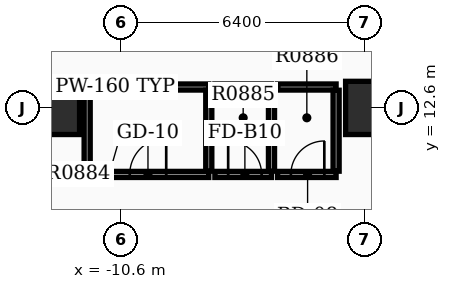
"""IFC4 building model, lengths in metres.
Left out: names, types, materials, properties, quantities, classifications, styles, units other than length and angle.
Written with IfcOpenShell. Run it as: python <this file> out.ifc"""

import sys

from ifc_helpers import new_model, si_unit, direction, frame, frame_2d, origin, origin_2d, place, context, subcontext, project, spatial, rectangle, extrude, element, fill, save


model = new_model("IFC4")
c1 = context("Model", 3, precision=1e-05, world=origin(), true_north=direction((0.0, 1.0)))
c2 = subcontext(c1, "Body", "Model", "MODEL_VIEW")
j1 = project(units=[si_unit("LENGTHUNIT", "METRE"), si_unit("PLANEANGLEUNIT", "RADIAN")], contexts=[c1])
p1 = place(None, origin())
s1 = spatial("IfcSite", under=j1, at=p1, CompositionType="ELEMENT")
p2 = place(p1, origin())
s2 = spatial("IfcBuilding", under=s1, at=p2, CompositionType="ELEMENT")
p3 = place(p2, frame((0.0, 0.0, 60.0)))
s3 = spatial("IfcBuildingStorey", under=s2, at=p3, CompositionType="ELEMENT", Elevation=60.0)
for number, where, z_axis, x_axis in (
    (1, (-12.4, 12.6, 0.0), (0.0, 0.0, 1.0), (1.0, 0.0, 0.0)),
    (2, (-4.0, 12.6, 0.0), (0.0, 0.0, 1.0), (1.0, 0.0, 0.0)),
):
    element("IfcColumn", number, at=place(p3, frame(where, z_axis=z_axis, x_axis=x_axis)), inside=s3, PredefinedType="COLUMN", context=c2, shape_type="SweptSolid", body=[
        extrude(rectangle(XDim=1.4, YDim=1.4, at=origin_2d()), origin(), (0.0, 0.0, 1.0), 3.9),
    ])
p4 = place(p3, frame((-11.5, 10.85, 0.0), z_axis=(0.0, 0.0, 1.0), x_axis=(1.0, 0.0, 0.0)))
e3 = element("IfcWall", 3, at=p4, inside=s3, PredefinedType="PARTITIONING", context=c2, shape_type="SweptSolid", body=[
    extrude(rectangle(XDim=3.2, YDim=0.16, at=frame_2d((1.6, 0.0))), origin(), (0.0, 0.0, 1.0), 2.9),
])
p5 = place(p4, frame((1.12, 0.0, 0.0)))
e4 = element("IfcOpeningElement", 4, at=p5, cuts=e3, PredefinedType="OPENING", context=c2, shape_type="SweptSolid", body=[
    extrude(rectangle(XDim=0.96, YDim=2.15, at=frame_2d((0.48, 1.075))), frame((0.0, 0.09, 0.0), z_axis=(0.0, -1.0, 0.0), x_axis=(1.0, 0.0, 0.0)), (0.0, 0.0, 1.0), 0.18),
])
p6 = place(p3, frame((-11.5, 13.15, 0.0), z_axis=(0.0, 0.0, 1.0), x_axis=(1.0, 0.0, 0.0)))
e5 = element("IfcWall", 5, at=p6, inside=s3, PredefinedType="PARTITIONING", context=c2, shape_type="SweptSolid", body=[
    extrude(rectangle(XDim=3.2, YDim=0.16, at=frame_2d((1.6, 0.0))), origin(), (0.0, 0.0, 1.0), 2.9),
])
for number, where, z_axis, x_axis in (
    (6, (-11.5, 10.935, 0.0), (0.0, 0.0, 1.0), (0.0, 1.0, 0.0)),
    (7, (-8.3, 10.935, 0.0), (0.0, 0.0, 1.0), (0.0, 1.0, 0.0)),
):
    element("IfcWall", number, at=place(p3, frame(where, z_axis=z_axis, x_axis=x_axis)), inside=s3, PredefinedType="PARTITIONING", context=c2, shape_type="SweptSolid", body=[
        extrude(rectangle(XDim=2.13, YDim=0.16, at=frame_2d((1.065, 0.0))), origin(), (0.0, 0.0, 1.0), 2.9),
    ])
p7 = place(p3, frame((-8.14, 10.85, 0.0), z_axis=(0.0, 0.0, 1.0), x_axis=(1.0, 0.0, 0.0)))
e8 = element("IfcWall", 8, at=p7, inside=s3, PredefinedType="PARTITIONING", context=c2, shape_type="SweptSolid", body=[
    extrude(rectangle(XDim=1.49, YDim=0.16, at=frame_2d((0.745, 0.0))), origin(), (0.0, 0.0, 1.0), 2.9),
])
p8 = place(p7, frame((0.35, 0.0, 0.0)))
e9 = element("IfcOpeningElement", 9, at=p8, cuts=e8, PredefinedType="OPENING", context=c2, shape_type="SweptSolid", body=[
    extrude(rectangle(XDim=0.88, YDim=2.1, at=frame_2d((0.44, 1.05))), frame((0.0, 0.09, 0.0), z_axis=(0.0, -1.0, 0.0), x_axis=(1.0, 0.0, 0.0)), (0.0, 0.0, 1.0), 0.18),
])
p9 = place(p3, frame((-8.14, 13.15, 0.0), z_axis=(0.0, 0.0, 1.0), x_axis=(1.0, 0.0, 0.0)))
e10 = element("IfcWall", 10, at=p9, inside=s3, PredefinedType="PARTITIONING", context=c2, shape_type="SweptSolid", body=[
    extrude(rectangle(XDim=1.49, YDim=0.16, at=frame_2d((0.745, 0.0))), origin(), (0.0, 0.0, 1.0), 2.9),
])
p10 = place(p3, frame((-6.65, 10.935, 0.0), z_axis=(0.0, 0.0, 1.0), x_axis=(0.0, 1.0, 0.0)))
e11 = element("IfcWall", 11, at=p10, inside=s3, PredefinedType="PARTITIONING", context=c2, shape_type="SweptSolid", body=[
    extrude(rectangle(XDim=2.13, YDim=0.16, at=frame_2d((1.065, 0.0))), origin(), (0.0, 0.0, 1.0), 2.9),
])
p11 = place(p3, frame((-6.49, 10.85, 0.0), z_axis=(0.0, 0.0, 1.0), x_axis=(1.0, 0.0, 0.0)))
e12 = element("IfcWall", 12, at=p11, inside=s3, PredefinedType="PARTITIONING", context=c2, shape_type="SweptSolid", body=[
    extrude(rectangle(XDim=1.54, YDim=0.16, at=frame_2d((0.77, 0.0))), origin(), (0.0, 0.0, 1.0), 2.9),
])
p12 = place(p11, frame((0.35, 0.0, 0.0)))
e13 = element("IfcOpeningElement", 13, at=p12, cuts=e12, PredefinedType="OPENING", context=c2, shape_type="SweptSolid", body=[
    extrude(rectangle(XDim=0.88, YDim=2.15, at=frame_2d((0.44, 1.075))), frame((0.0, 0.09, 0.0), z_axis=(0.0, -1.0, 0.0), x_axis=(1.0, 0.0, 0.0)), (0.0, 0.0, 1.0), 0.18),
])
p13 = place(p3, frame((-6.49, 13.15, 0.0), z_axis=(0.0, 0.0, 1.0), x_axis=(1.0, 0.0, 0.0)))
e14 = element("IfcWall", 14, at=p13, inside=s3, PredefinedType="PARTITIONING", context=c2, shape_type="SweptSolid", body=[
    extrude(rectangle(XDim=1.54, YDim=0.16, at=frame_2d((0.77, 0.0))), origin(), (0.0, 0.0, 1.0), 2.9),
])
p14 = place(p3, frame((-4.95, 10.935, 0.0), z_axis=(0.0, 0.0, 1.0), x_axis=(0.0, 1.0, 0.0)))
e15 = element("IfcWall", 15, at=p14, inside=s3, PredefinedType="PARTITIONING", context=c2, shape_type="SweptSolid", body=[
    extrude(rectangle(XDim=2.13, YDim=0.16, at=frame_2d((1.065, 0.0))), origin(), (0.0, 0.0, 1.0), 2.9),
])
p15 = place(p5, origin())
e16 = element("IfcDoor", 16, at=p15, inside=s3, OperationType="SINGLE_SWING_RIGHT", PredefinedType="DOOR", context=c2, shape_type="SweptSolid", body=[
    extrude(rectangle(XDim=0.96, YDim=2.15, at=frame_2d((0.48, 1.075))), frame((0.0, 0.025, 0.0), z_axis=(0.0, -1.0, 0.0), x_axis=(1.0, 0.0, 0.0)), (0.0, 0.0, 1.0), 0.05),
])
fill(e4, e16)
p16 = place(p8, origin())
e17 = element("IfcDoor", 17, at=p16, inside=s3, OperationType="SINGLE_SWING_LEFT", PredefinedType="DOOR", context=c2, shape_type="SweptSolid", body=[
    extrude(rectangle(XDim=0.88, YDim=2.1, at=frame_2d((0.44, 1.05))), frame((0.0, 0.025, 0.0), z_axis=(0.0, -1.0, 0.0), x_axis=(1.0, 0.0, 0.0)), (0.0, 0.0, 1.0), 0.05),
])
fill(e9, e17)
p17 = place(p12, origin())
e18 = element("IfcDoor", 18, at=p17, inside=s3, OperationType="SINGLE_SWING_RIGHT", PredefinedType="DOOR", context=c2, shape_type="SweptSolid", body=[
    extrude(rectangle(XDim=0.88, YDim=2.15, at=frame_2d((0.44, 1.075))), frame((0.0, 0.025, 0.0), z_axis=(0.0, -1.0, 0.0), x_axis=(1.0, 0.0, 0.0)), (0.0, 0.0, 1.0), 0.05),
])
fill(e13, e18)
save(model, sys.argv[1])
